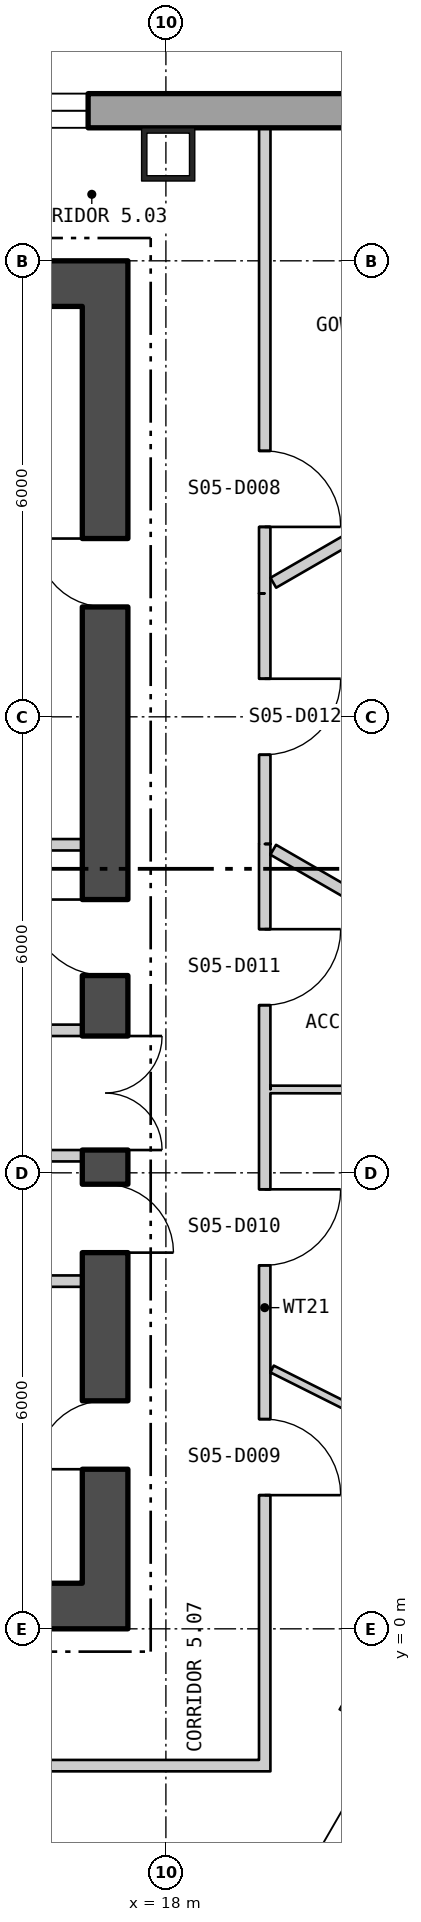
"""IFC4 building model, lengths in metres.
Left out: names, types, materials, properties, quantities, classifications, styles, units other than length and angle.
Written with IfcOpenShell. Run it as: python <this file> out.ifc"""

import sys

from ifc_helpers import new_model, si_unit, direction, frame, frame_2d, origin, origin_2d, place, context, subcontext, project, spatial, polyline, rectangle, hollow_rectangle, outline, extrude, element, fill, save


model = new_model("IFC4")
c1 = context("Model", 3, precision=1e-05, world=origin(), true_north=direction((0.0, 1.0)))
c2 = subcontext(c1, "Body", "Model", "MODEL_VIEW")
j1 = project(units=[si_unit("LENGTHUNIT", "METRE"), si_unit("PLANEANGLEUNIT", "RADIAN")], contexts=[c1])
p1 = place(None, origin())
s1 = spatial("IfcSite", under=j1, at=p1, CompositionType="ELEMENT")
p2 = place(p1, origin())
s2 = spatial("IfcBuilding", under=s1, at=p2, CompositionType="ELEMENT")
p3 = place(p2, frame((0.0, 0.0, 69.3)))
s3 = spatial("IfcBuildingStorey", under=s2, at=p3, CompositionType="ELEMENT", Elevation=69.3)
for number, where, z_axis, x_axis in (
    (1, (18.03, 19.4, 0.0), (0.0, 0.0, 1.0), (-1.0, 0.0, 0.0)),
    (2, (20.755, -0.934, 0.0), (0.0, 0.0, 1.0), (0.5, 0.866, 0.0)),
):
    element("IfcColumn", number, at=place(p3, frame(where, z_axis=z_axis, x_axis=x_axis)), inside=s3, PredefinedType="COLUMN", context=c2, shape_type="SweptSolid", body=[
        extrude(hollow_rectangle(XDim=0.7, YDim=0.7, WallThickness=0.07, at=origin_2d()), origin(), (0.0, 0.0, 1.0), 4.5),
    ])
p4 = place(p3, frame((22.87, 19.975, -0.4), z_axis=(0.0, 0.0, 1.0), x_axis=(-1.0, 0.0, 0.0)))
e3 = element("IfcWall", 3, at=p4, inside=s3, PredefinedType="SOLIDWALL", context=c2, shape_type="SweptSolid", body=[
    extrude(outline(polyline([(-0.13, -0.225), (45.87, -0.225), (45.61, 0.225), (0.13, 0.225), (-0.13, -0.225)])), origin(), (0.0, 0.0, 1.0), 4.5),
])
p5 = place(p4, frame((5.893, 0.0, 1.3)))
e4 = element("IfcOpeningElement", 4, at=p5, cuts=e3, PredefinedType="OPENING", context=c2, shape_type="SweptSolid", body=[
    extrude(rectangle(XDim=2.4, YDim=2.6, at=frame_2d((1.2, 1.3))), frame((0.0, 0.235, 0.0), z_axis=(0.0, -1.0, 0.0), x_axis=(1.0, 0.0, 0.0)), (0.0, 0.0, 1.0), 0.47),
])
p6 = place(p4, frame((10.401, 0.0, 1.3)))
e5 = element("IfcOpeningElement", 5, at=p6, cuts=e3, PredefinedType="OPENING", context=c2, shape_type="SweptSolid", body=[
    extrude(rectangle(XDim=2.4, YDim=2.6, at=frame_2d((1.2, 1.3))), frame((0.0, 0.235, 0.0), z_axis=(0.0, -1.0, 0.0), x_axis=(1.0, 0.0, 0.0)), (0.0, 0.0, 1.0), 0.47),
])
p7 = place(p4, frame((14.909, 0.0, 1.3)))
e6 = element("IfcOpeningElement", 6, at=p7, cuts=e3, PredefinedType="OPENING", context=c2, shape_type="SweptSolid", body=[
    extrude(rectangle(XDim=2.4, YDim=2.6, at=frame_2d((1.2, 1.3))), frame((0.0, 0.235, 0.0), z_axis=(0.0, -1.0, 0.0), x_axis=(1.0, 0.0, 0.0)), (0.0, 0.0, 1.0), 0.47),
])
p8 = place(p4, frame((19.416, 0.0, 1.3)))
e7 = element("IfcOpeningElement", 7, at=p8, cuts=e3, PredefinedType="OPENING", context=c2, shape_type="SweptSolid", body=[
    extrude(rectangle(XDim=2.4, YDim=2.6, at=frame_2d((1.2, 1.3))), frame((0.0, 0.235, 0.0), z_axis=(0.0, -1.0, 0.0), x_axis=(1.0, 0.0, 0.0)), (0.0, 0.0, 1.0), 0.47),
])
p9 = place(p4, frame((23.924, 0.0, 1.3)))
e8 = element("IfcOpeningElement", 8, at=p9, cuts=e3, PredefinedType="OPENING", context=c2, shape_type="SweptSolid", body=[
    extrude(rectangle(XDim=2.4, YDim=2.6, at=frame_2d((1.2, 1.3))), frame((0.0, 0.235, 0.0), z_axis=(0.0, -1.0, 0.0), x_axis=(1.0, 0.0, 0.0)), (0.0, 0.0, 1.0), 0.47),
])
p10 = place(p4, frame((28.431, 0.0, 1.3)))
e9 = element("IfcOpeningElement", 9, at=p10, cuts=e3, PredefinedType="OPENING", context=c2, shape_type="SweptSolid", body=[
    extrude(rectangle(XDim=2.4, YDim=2.6, at=frame_2d((1.2, 1.3))), frame((0.0, 0.235, 0.0), z_axis=(0.0, -1.0, 0.0), x_axis=(1.0, 0.0, 0.0)), (0.0, 0.0, 1.0), 0.47),
])
p11 = place(p4, frame((32.939, 0.0, 1.3)))
e10 = element("IfcOpeningElement", 10, at=p11, cuts=e3, PredefinedType="OPENING", context=c2, shape_type="SweptSolid", body=[
    extrude(rectangle(XDim=2.4, YDim=2.6, at=frame_2d((1.2, 1.3))), frame((0.0, 0.235, 0.0), z_axis=(0.0, -1.0, 0.0), x_axis=(1.0, 0.0, 0.0)), (0.0, 0.0, 1.0), 0.47),
])
p12 = place(p4, frame((37.447, 0.0, 1.3)))
e11 = element("IfcOpeningElement", 11, at=p12, cuts=e3, PredefinedType="OPENING", context=c2, shape_type="SweptSolid", body=[
    extrude(rectangle(XDim=2.4, YDim=2.6, at=frame_2d((1.2, 1.3))), frame((0.0, 0.235, 0.0), z_axis=(0.0, -1.0, 0.0), x_axis=(1.0, 0.0, 0.0)), (0.0, 0.0, 1.0), 0.47),
])
p13 = place(p3, frame((5.31, -28.834, -0.18), z_axis=(0.0, 0.0, 1.0), x_axis=(0.500000711659, 0.866024992908, 0.0)))
e12 = element("IfcWall", 12, at=p13, inside=s3, PredefinedType="SOLIDWALL", context=c2, shape_type="SweptSolid", body=[
    extrude(outline(polyline([(-0.13, -0.225), (45.87, -0.225), (45.61, 0.225), (0.13, 0.225), (-0.13, -0.225)])), origin(), (0.0, 0.0, 1.0), 4.28),
])
p14 = place(p13, frame((1.424, 0.0, 1.08)))
e13 = element("IfcOpeningElement", 13, at=p14, cuts=e12, PredefinedType="OPENING", context=c2, shape_type="SweptSolid", body=[
    extrude(rectangle(XDim=2.4, YDim=2.6, at=frame_2d((1.2, 1.3))), frame((0.0, 0.235, 0.0), z_axis=(0.0, -1.0, 0.0), x_axis=(1.0, 0.0, 0.0)), (0.0, 0.0, 1.0), 0.47),
])
p15 = place(p13, frame((5.893, 0.0, 1.08)))
e14 = element("IfcOpeningElement", 14, at=p15, cuts=e12, PredefinedType="OPENING", context=c2, shape_type="SweptSolid", body=[
    extrude(rectangle(XDim=2.4, YDim=2.6, at=frame_2d((1.2, 1.3))), frame((0.0, 0.235, 0.0), z_axis=(0.0, -1.0, 0.0), x_axis=(1.0, 0.0, 0.0)), (0.0, 0.0, 1.0), 0.47),
])
p16 = place(p13, frame((10.401, 0.0, 1.08)))
e15 = element("IfcOpeningElement", 15, at=p16, cuts=e12, PredefinedType="OPENING", context=c2, shape_type="SweptSolid", body=[
    extrude(rectangle(XDim=2.4, YDim=2.6, at=frame_2d((1.2, 1.3))), frame((0.0, 0.235, 0.0), z_axis=(0.0, -1.0, 0.0), x_axis=(1.0, 0.0, 0.0)), (0.0, 0.0, 1.0), 0.47),
])
p17 = place(p13, frame((14.909, 0.0, 1.08)))
e16 = element("IfcOpeningElement", 16, at=p17, cuts=e12, PredefinedType="OPENING", context=c2, shape_type="SweptSolid", body=[
    extrude(rectangle(XDim=2.4, YDim=2.6, at=frame_2d((1.2, 1.3))), frame((0.0, 0.235, 0.0), z_axis=(0.0, -1.0, 0.0), x_axis=(1.0, 0.0, 0.0)), (0.0, 0.0, 1.0), 0.47),
])
p18 = place(p13, frame((19.416, 0.0, 1.08)))
e17 = element("IfcOpeningElement", 17, at=p18, cuts=e12, PredefinedType="OPENING", context=c2, shape_type="SweptSolid", body=[
    extrude(rectangle(XDim=2.4, YDim=2.6, at=frame_2d((1.2, 1.3))), frame((0.0, 0.235, 0.0), z_axis=(0.0, -1.0, 0.0), x_axis=(1.0, 0.0, 0.0)), (0.0, 0.0, 1.0), 0.47),
])
p19 = place(p13, frame((23.924, 0.0, 1.08)))
e18 = element("IfcOpeningElement", 18, at=p19, cuts=e12, PredefinedType="OPENING", context=c2, shape_type="SweptSolid", body=[
    extrude(rectangle(XDim=2.4, YDim=2.6, at=frame_2d((1.2, 1.3))), frame((0.0, 0.235, 0.0), z_axis=(0.0, -1.0, 0.0), x_axis=(1.0, 0.0, 0.0)), (0.0, 0.0, 1.0), 0.47),
])
p20 = place(p13, frame((28.431, 0.0, 1.08)))
e19 = element("IfcOpeningElement", 19, at=p20, cuts=e12, PredefinedType="OPENING", context=c2, shape_type="SweptSolid", body=[
    extrude(rectangle(XDim=2.4, YDim=2.6, at=frame_2d((1.2, 1.3))), frame((0.0, 0.235, 0.0), z_axis=(0.0, -1.0, 0.0), x_axis=(1.0, 0.0, 0.0)), (0.0, 0.0, 1.0), 0.47),
])
p21 = place(p13, frame((37.447, 0.0, 1.08)))
e20 = element("IfcOpeningElement", 20, at=p21, cuts=e12, PredefinedType="OPENING", context=c2, shape_type="SweptSolid", body=[
    extrude(rectangle(XDim=2.4, YDim=2.6, at=frame_2d((1.2, 1.3))), frame((0.0, 0.235, 0.0), z_axis=(0.0, -1.0, 0.0), x_axis=(1.0, 0.0, 0.0)), (0.0, 0.0, 1.0), 0.47),
])
p22 = place(p13, frame((41.916, 0.0, 1.08)))
e21 = element("IfcOpeningElement", 21, at=p22, cuts=e12, PredefinedType="OPENING", context=c2, shape_type="SweptSolid", body=[
    extrude(rectangle(XDim=2.4, YDim=2.6, at=frame_2d((1.2, 1.3))), frame((0.0, 0.235, 0.0), z_axis=(0.0, -1.0, 0.0), x_axis=(1.0, 0.0, 0.0)), (0.0, 0.0, 1.0), 0.47),
])
p23 = place(p3, frame((-17.5, 0.3, 0.0), z_axis=(0.0, 0.0, 1.0), x_axis=(1.0, 0.0, 0.0)))
e22 = element("IfcWall", 22, at=p23, inside=s3, PredefinedType="SHEAR", context=c2, shape_type="SweptSolid", body=[
    extrude(rectangle(XDim=35.0, YDim=0.6, at=frame_2d((17.5, 0.0))), origin(), (0.0, 0.0, 1.0), 4.3),
])
p24 = place(p23, frame((12.0, 0.0, 0.0)))
e23 = element("IfcOpeningElement", 23, at=p24, cuts=e22, PredefinedType="OPENING", context=c2, shape_type="SweptSolid", body=[
    extrude(rectangle(XDim=1.8, YDim=2.4, at=frame_2d((0.9, 1.2))), frame((0.0, 0.31, 0.0), z_axis=(0.0, -1.0, 0.0), x_axis=(1.0, 0.0, 0.0)), (0.0, 0.0, 1.0), 0.62),
])
p25 = place(p23, frame((22.0, 0.0, 0.0)))
e24 = element("IfcOpeningElement", 24, at=p25, cuts=e22, PredefinedType="OPENING", context=c2, shape_type="SweptSolid", body=[
    extrude(rectangle(XDim=1.8, YDim=2.4, at=frame_2d((0.9, 1.2))), frame((0.0, 0.31, 0.0), z_axis=(0.0, -1.0, 0.0), x_axis=(1.0, 0.0, 0.0)), (0.0, 0.0, 1.0), 0.62),
])
p26 = place(p3, frame((-17.5, 17.7, 0.0), z_axis=(0.0, 0.0, 1.0), x_axis=(1.0, 0.0, 0.0)))
e25 = element("IfcWall", 25, at=p26, inside=s3, PredefinedType="SHEAR", context=c2, shape_type="SweptSolid", body=[
    extrude(rectangle(XDim=35.0, YDim=0.6, at=frame_2d((17.5, 0.0))), origin(), (0.0, 0.0, 1.0), 4.3),
])
p27 = place(p3, frame((17.2, 0.6, 0.0), z_axis=(0.0, 0.0, 1.0), x_axis=(0.0, 1.0, 0.0)))
e26 = element("IfcWall", 26, at=p27, inside=s3, PredefinedType="SHEAR", context=c2, shape_type="SweptSolid", body=[
    extrude(rectangle(XDim=16.8, YDim=0.6, at=frame_2d((8.4, 0.0))), origin(), (0.0, 0.0, 1.0), 4.3),
])
p28 = place(p27, frame((5.7, 0.0, 0.0)))
e27 = element("IfcOpeningElement", 27, at=p28, cuts=e26, PredefinedType="OPENING", context=c2, shape_type="SweptSolid", body=[
    extrude(rectangle(XDim=1.5, YDim=2.1, at=frame_2d((0.75, 1.05))), frame((0.0, 0.31, 0.0), z_axis=(0.0, -1.0, 0.0), x_axis=(1.0, 0.0, 0.0)), (0.0, 0.0, 1.0), 0.62),
])
p29 = place(p27, frame((1.5, 0.0, 0.0)))
e28 = element("IfcOpeningElement", 28, at=p29, cuts=e26, PredefinedType="OPENING", context=c2, shape_type="SweptSolid", body=[
    extrude(rectangle(XDim=0.9, YDim=2.1, at=frame_2d((0.45, 1.05))), frame((0.0, 0.31, 0.0), z_axis=(0.0, -1.0, 0.0), x_axis=(1.0, 0.0, 0.0)), (0.0, 0.0, 1.0), 0.62),
])
p30 = place(p27, frame((4.35, 0.0, 0.0)))
e29 = element("IfcOpeningElement", 29, at=p30, cuts=e26, PredefinedType="OPENING", context=c2, shape_type="SweptSolid", body=[
    extrude(rectangle(XDim=0.9, YDim=2.1, at=frame_2d((0.45, 1.05))), frame((0.0, 0.31, 0.0), z_axis=(0.0, -1.0, 0.0), x_axis=(1.0, 0.0, 0.0)), (0.0, 0.0, 1.0), 0.62),
])
p31 = place(p27, frame((7.996, 0.0, 0.0)))
e30 = element("IfcOpeningElement", 30, at=p31, cuts=e26, PredefinedType="OPENING", context=c2, shape_type="SweptSolid", body=[
    extrude(rectangle(XDim=1.0, YDim=2.1, at=frame_2d((0.5, 1.05))), frame((0.0, 0.31, 0.0), z_axis=(0.0, -1.0, 0.0), x_axis=(1.0, 0.0, 0.0)), (0.0, 0.0, 1.0), 0.62),
])
p32 = place(p27, frame((12.846, 0.0, 0.0)))
e31 = element("IfcOpeningElement", 31, at=p32, cuts=e26, PredefinedType="OPENING", context=c2, shape_type="SweptSolid", body=[
    extrude(rectangle(XDim=0.9, YDim=2.1, at=frame_2d((0.45, 1.05))), frame((0.0, 0.31, 0.0), z_axis=(0.0, -1.0, 0.0), x_axis=(1.0, 0.0, 0.0)), (0.0, 0.0, 1.0), 0.62),
])
for number, where, z_axis, x_axis in (
    (32, (14.5, 6.225, 0.0), (0.0, 0.0, 1.0), (1.0, 0.0, 0.0)),
    (33, (14.5, 7.875, 0.0), (0.0, 0.0, 1.0), (1.0, 0.0, 0.0)),
    (34, (14.5, 4.575, 0.0), (0.0, 0.0, 1.0), (1.0, 0.0, 0.0)),
    (35, (14.5, 10.317, 0.0), (0.0, 0.0, 1.0), (1.0, 0.0, 0.0)),
):
    element("IfcWall", number, at=place(p3, frame(where, z_axis=z_axis, x_axis=x_axis)), inside=s3, PredefinedType="PARTITIONING", context=c2, shape_type="SweptSolid", body=[
        extrude(rectangle(XDim=2.4, YDim=0.15, at=frame_2d((1.2, 0.0))), origin(), (0.0, 0.0, 1.0), 4.3),
    ])
p33 = place(p3, frame((7.795, -1.8, 0.0), z_axis=(0.0, 0.0, 1.0), x_axis=(1.0, 0.0, 0.0)))
e36 = element("IfcWall", 36, at=p33, inside=s3, PredefinedType="PARTITIONING", context=c2, shape_type="SweptSolid", body=[
    extrude(rectangle(XDim=11.43, YDim=0.15, at=frame_2d((5.715, 0.0))), origin(), (0.0, 0.0, 1.0), 4.3),
])
p34 = place(p33, frame((2.121, 0.0, 0.0)))
e37 = element("IfcOpeningElement", 37, at=p34, cuts=e36, PredefinedType="OPENING", context=c2, shape_type="SweptSolid", body=[
    extrude(rectangle(XDim=1.0, YDim=2.1, at=frame_2d((0.5, 1.05))), frame((0.0, 0.085, 0.0), z_axis=(0.0, -1.0, 0.0), x_axis=(1.0, 0.0, 0.0)), (0.0, 0.0, 1.0), 0.17),
])
p35 = place(p3, frame((13.484, -1.94, 0.0), z_axis=(0.0, 0.0, 1.0), x_axis=(0.866018876994, -0.500011304563, 0.0)))
e38 = element("IfcWall", 38, at=p35, inside=s3, PredefinedType="PARTITIONING", context=c2, shape_type="SweptSolid", body=[
    extrude(rectangle(XDim=5.694, YDim=0.15, at=frame_2d((2.847, 0.0))), origin(), (0.0, 0.0, 1.0), 4.3),
])
p36 = place(p3, frame((19.3, 13.624, 0.0), z_axis=(0.0, 0.0, 1.0), x_axis=(0.000163238653, 0.999999986677, 0.0)))
e39 = element("IfcWall", 39, at=p36, inside=s3, PredefinedType="PARTITIONING", context=c2, shape_type="SweptSolid", body=[
    extrude(rectangle(XDim=6.126, YDim=0.15, at=frame_2d((3.063, 0.0))), origin(), (0.0, 0.0, 1.0), 4.3),
])
p37 = place(p36, frame((0.875, 0.0, 0.0)))
e40 = element("IfcOpeningElement", 40, at=p37, cuts=e39, PredefinedType="OPENING", context=c2, shape_type="SweptSolid", body=[
    extrude(rectangle(XDim=1.0, YDim=2.1, at=frame_2d((0.5, 1.05))), frame((0.0, 0.085, 0.0), z_axis=(0.0, -1.0, 0.0), x_axis=(1.0, 0.0, 0.0)), (0.0, 0.0, 1.0), 0.17),
])
p38 = place(p3, frame((19.3, -1.875, 0.0), z_axis=(0.0, 0.0, 1.0), x_axis=(0.0, 1.0, 0.0)))
e41 = element("IfcWall", 41, at=p38, inside=s3, PredefinedType="PARTITIONING", context=c2, shape_type="SweptSolid", body=[
    extrude(rectangle(XDim=12.202, YDim=0.15, at=frame_2d((6.101, 0.0))), origin(), (0.0, 0.0, 1.0), 4.3),
])
p39 = place(p38, frame((3.634, 0.0, 0.0)))
e42 = element("IfcOpeningElement", 42, at=p39, cuts=e41, PredefinedType="OPENING", context=c2, shape_type="SweptSolid", body=[
    extrude(rectangle(XDim=1.0, YDim=2.1, at=frame_2d((0.5, 1.05))), frame((0.0, 0.085, 0.0), z_axis=(0.0, -1.0, 0.0), x_axis=(1.0, 0.0, 0.0)), (0.0, 0.0, 1.0), 0.17),
])
p40 = place(p38, frame((6.658, 0.0, 0.0)))
e43 = element("IfcOpeningElement", 43, at=p40, cuts=e41, PredefinedType="OPENING", context=c2, shape_type="SweptSolid", body=[
    extrude(rectangle(XDim=1.0, YDim=2.1, at=frame_2d((0.5, 1.05))), frame((0.0, 0.085, 0.0), z_axis=(0.0, -1.0, 0.0), x_axis=(1.0, 0.0, 0.0)), (0.0, 0.0, 1.0), 0.17),
])
p41 = place(p38, frame((10.081, 0.0, 0.0)))
e44 = element("IfcOpeningElement", 44, at=p41, cuts=e41, PredefinedType="OPENING", context=c2, shape_type="SweptSolid", body=[
    extrude(rectangle(XDim=1.0, YDim=2.1, at=frame_2d((0.5, 1.05))), frame((0.0, 0.085, 0.0), z_axis=(0.0, -1.0, 0.0), x_axis=(1.0, 0.0, 0.0)), (0.0, 0.0, 1.0), 0.17),
])
p42 = place(p3, frame((19.3, 13.624, 0.0), z_axis=(0.0, 0.0, 1.0), x_axis=(0.000303306022, -0.999999954003, 0.0)))
e45 = element("IfcWall", 45, at=p42, inside=s3, PredefinedType="PARTITIONING", context=c2, shape_type="SweptSolid", body=[
    extrude(rectangle(XDim=3.297, YDim=0.15, at=frame_2d((1.649, 0.0))), origin(), (0.0, 0.0, 1.0), 4.3),
])
p43 = place(p42, frame((1.123, 0.0, 0.0)))
e46 = element("IfcOpeningElement", 46, at=p43, cuts=e45, PredefinedType="OPENING", context=c2, shape_type="SweptSolid", body=[
    extrude(rectangle(XDim=1.0, YDim=2.1, at=frame_2d((0.5, 1.05))), frame((0.0, 0.085, 0.0), z_axis=(0.0, -1.0, 0.0), x_axis=(1.0, 0.0, 0.0)), (0.0, 0.0, 1.0), 0.17),
])
p44 = place(p3, frame((19.375, 7.097, 0.0), z_axis=(0.0, 0.0, 1.0), x_axis=(0.999998546715, -0.001704865869, 0.0)))
e47 = element("IfcWall", 47, at=p44, inside=s3, PredefinedType="PARTITIONING", context=c2, shape_type="SweptSolid", body=[
    extrude(rectangle(XDim=5.279, YDim=0.1, at=frame_2d((2.639, 0.0))), origin(), (0.0, 0.0, 1.0), 4.3),
])
p45 = place(p3, frame((19.397, 3.419, 0.0), z_axis=(0.0, 0.0, 1.0), x_axis=(0.894157297607, -0.447752975574, 0.0)))
e48 = element("IfcWall", 48, at=p45, inside=s3, PredefinedType="PARTITIONING", context=c2, shape_type="SweptSolid", body=[
    extrude(rectangle(XDim=3.707, YDim=0.1, at=frame_2d((1.854, 0.0))), origin(), (0.0, 0.0, 1.0), 4.3),
])
p46 = place(p3, frame((19.412, 10.251, 0.0), z_axis=(0.0, 0.0, 1.0), x_axis=(0.866080503844, -0.49990455175, 0.0)))
e49 = element("IfcWall", 49, at=p46, inside=s3, PredefinedType="PARTITIONING", context=c2, shape_type="SweptSolid", body=[
    extrude(rectangle(XDim=6.655, YDim=0.15, at=frame_2d((3.328, 0.0))), origin(), (0.0, 0.0, 1.0), 4.3),
])
p47 = place(p3, frame((19.413, 13.764, 0.0), z_axis=(0.0, 0.0, 1.0), x_axis=(0.866056658381, 0.499945861543, 0.0)))
e50 = element("IfcWall", 50, at=p47, inside=s3, PredefinedType="PARTITIONING", context=c2, shape_type="SweptSolid", body=[
    extrude(rectangle(XDim=5.425, YDim=0.15, at=frame_2d((2.712, 0.0))), origin(), (0.0, 0.0, 1.0), 4.3),
])
p48 = place(p5, origin())
e51 = element("IfcWindow", 51, at=p48, inside=s3, PartitioningType="SINGLE_PANEL", PredefinedType="WINDOW", context=c2, shape_type="SweptSolid", body=[
    extrude(rectangle(XDim=2.4, YDim=2.6, at=frame_2d((1.2, 1.3))), frame((0.0, 0.105, 0.0), z_axis=(0.0, -1.0, 0.0), x_axis=(1.0, 0.0, 0.0)), (0.0, 0.0, 1.0), 0.06),
])
fill(e4, e51)
p49 = place(p20, origin())
e52 = element("IfcWindow", 52, at=p49, inside=s3, PartitioningType="SINGLE_PANEL", PredefinedType="WINDOW", context=c2, shape_type="SweptSolid", body=[
    extrude(rectangle(XDim=2.4, YDim=2.6, at=frame_2d((1.2, 1.3))), frame((0.0, 0.105, 0.0), z_axis=(0.0, -1.0, 0.0), x_axis=(1.0, 0.0, 0.0)), (0.0, 0.0, 1.0), 0.06),
])
fill(e19, e52)
p50 = place(p28, origin())
e53 = element("IfcDoor", 53, at=p50, inside=s3, OperationType="DOUBLE_DOOR_SINGLE_SWING", PredefinedType="DOOR", context=c2, shape_type="SweptSolid", body=[
    extrude(rectangle(XDim=1.5, YDim=2.1, at=frame_2d((0.75, 1.05))), frame((0.0, 0.025, 0.0), z_axis=(0.0, -1.0, 0.0), x_axis=(1.0, 0.0, 0.0)), (0.0, 0.0, 1.0), 0.05),
])
fill(e27, e53)
p51 = place(p29, origin())
e54 = element("IfcDoor", 54, at=p51, inside=s3, OperationType="SINGLE_SWING_RIGHT", PredefinedType="DOOR", context=c2, shape_type="SweptSolid", body=[
    extrude(rectangle(XDim=0.9, YDim=2.1, at=frame_2d((0.45, 1.05))), frame((0.0, 0.025, 0.0), z_axis=(0.0, -1.0, 0.0), x_axis=(1.0, 0.0, 0.0)), (0.0, 0.0, 1.0), 0.05),
])
fill(e28, e54)
p52 = place(p30, origin())
e55 = element("IfcDoor", 55, at=p52, inside=s3, OperationType="SINGLE_SWING_LEFT", PredefinedType="DOOR", context=c2, shape_type="SweptSolid", body=[
    extrude(rectangle(XDim=0.9, YDim=2.1, at=frame_2d((0.45, 1.05))), frame((0.0, 0.025, 0.0), z_axis=(0.0, -1.0, 0.0), x_axis=(1.0, 0.0, 0.0)), (0.0, 0.0, 1.0), 0.05),
])
fill(e29, e55)
p53 = place(p31, origin())
e56 = element("IfcDoor", 56, at=p53, inside=s3, OperationType="SINGLE_SWING_LEFT", PredefinedType="DOOR", context=c2, shape_type="SweptSolid", body=[
    extrude(rectangle(XDim=1.0, YDim=2.1, at=frame_2d((0.5, 1.05))), frame((0.0, 0.025, 0.0), z_axis=(0.0, -1.0, 0.0), x_axis=(1.0, 0.0, 0.0)), (0.0, 0.0, 1.0), 0.05),
])
fill(e30, e56)
p54 = place(p32, origin())
e57 = element("IfcDoor", 57, at=p54, inside=s3, OperationType="SINGLE_SWING_LEFT", PredefinedType="DOOR", context=c2, shape_type="SweptSolid", body=[
    extrude(rectangle(XDim=0.9, YDim=2.1, at=frame_2d((0.45, 1.05))), frame((0.0, 0.025, 0.0), z_axis=(0.0, -1.0, 0.0), x_axis=(1.0, 0.0, 0.0)), (0.0, 0.0, 1.0), 0.05),
])
fill(e31, e57)
p55 = place(p37, origin())
e58 = element("IfcDoor", 58, at=p55, inside=s3, OperationType="SINGLE_SWING_LEFT", PredefinedType="DOOR", context=c2, shape_type="SweptSolid", body=[
    extrude(rectangle(XDim=1.0, YDim=2.1, at=frame_2d((0.5, 1.05))), frame((0.0, 0.025, 0.0), z_axis=(0.0, -1.0, 0.0), x_axis=(1.0, 0.0, 0.0)), (0.0, 0.0, 1.0), 0.05),
])
fill(e40, e58)
p56 = place(p39, origin())
e59 = element("IfcDoor", 59, at=p56, inside=s3, OperationType="SINGLE_SWING_LEFT", PredefinedType="DOOR", context=c2, shape_type="SweptSolid", body=[
    extrude(rectangle(XDim=1.0, YDim=2.1, at=frame_2d((0.5, 1.05))), frame((0.0, 0.025, 0.0), z_axis=(0.0, -1.0, 0.0), x_axis=(1.0, 0.0, 0.0)), (0.0, 0.0, 1.0), 0.05),
])
fill(e42, e59)
p57 = place(p40, origin())
e60 = element("IfcDoor", 60, at=p57, inside=s3, OperationType="SINGLE_SWING_RIGHT", PredefinedType="DOOR", context=c2, shape_type="SweptSolid", body=[
    extrude(rectangle(XDim=1.0, YDim=2.1, at=frame_2d((0.5, 1.05))), frame((0.0, 0.025, 0.0), z_axis=(0.0, -1.0, 0.0), x_axis=(1.0, 0.0, 0.0)), (0.0, 0.0, 1.0), 0.05),
])
fill(e43, e60)
p58 = place(p41, origin())
e61 = element("IfcDoor", 61, at=p58, inside=s3, OperationType="SINGLE_SWING_RIGHT", PredefinedType="DOOR", context=c2, shape_type="SweptSolid", body=[
    extrude(rectangle(XDim=1.0, YDim=2.1, at=frame_2d((0.5, 1.05))), frame((0.0, 0.025, 0.0), z_axis=(0.0, -1.0, 0.0), x_axis=(1.0, 0.0, 0.0)), (0.0, 0.0, 1.0), 0.05),
])
fill(e44, e61)
p59 = place(p43, origin())
e62 = element("IfcDoor", 62, at=p59, inside=s3, OperationType="SINGLE_SWING_RIGHT", PredefinedType="DOOR", context=c2, shape_type="SweptSolid", body=[
    extrude(rectangle(XDim=1.0, YDim=2.1, at=frame_2d((0.5, 1.05))), frame((0.0, 0.025, 0.0), z_axis=(0.0, -1.0, 0.0), x_axis=(1.0, 0.0, 0.0)), (0.0, 0.0, 1.0), 0.05),
])
fill(e46, e62)
save(model, sys.argv[1])
